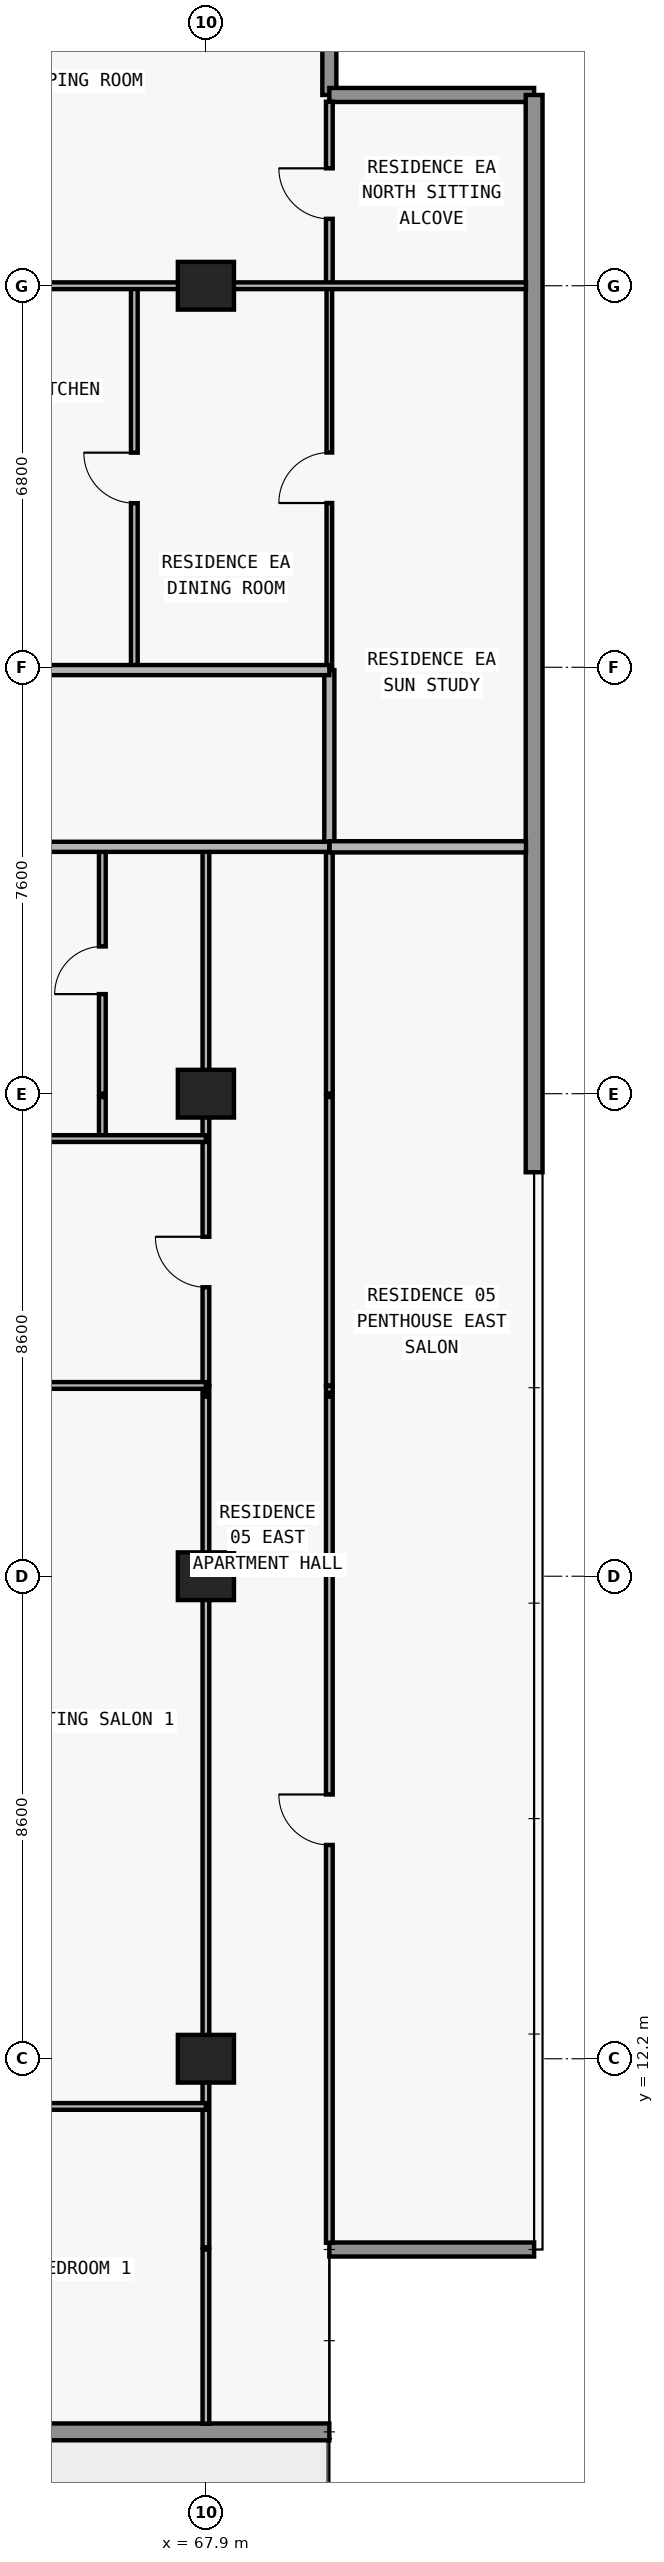
"""IFC4 building model, lengths in metres.
Left out: names, types, materials, properties, quantities, classifications, styles, units other than length and angle.
Written with IfcOpenShell. Run it as: python <this file> out.ifc"""

import sys

from ifc_helpers import new_model, si_unit, direction, frame, frame_2d, origin, origin_2d, place, context, subcontext, project, spatial, rectangle, extrude, element, fill, save


model = new_model("IFC4")
c1 = context("Model", 3, precision=1e-05, world=origin(), true_north=direction((0.0, 1.0)))
c2 = subcontext(c1, "Body", "Model", "MODEL_VIEW")
j1 = project(units=[si_unit("LENGTHUNIT", "METRE"), si_unit("PLANEANGLEUNIT", "RADIAN")], contexts=[c1])
p1 = place(None, origin())
s1 = spatial("IfcSite", under=j1, at=p1, CompositionType="ELEMENT")
p2 = place(p1, origin())
s2 = spatial("IfcBuilding", under=s1, at=p2, CompositionType="ELEMENT")
p3 = place(p2, frame((0.0, 0.0, 94.5)))
s3 = spatial("IfcBuildingStorey", under=s2, at=p3, CompositionType="ELEMENT", Elevation=94.5)
for number, where, z_axis, x_axis in (
    (1, (67.9, 12.2, 0.0), (0.0, 0.0, 1.0), (1.0, 0.0, 0.0)),
    (2, (67.9, 20.8, 0.0), (0.0, 0.0, 1.0), (1.0, 0.0, 0.0)),
    (3, (67.9, 29.4, 0.0), (0.0, 0.0, 1.0), (1.0, 0.0, 0.0)),
    (4, (67.9, 43.8, 0.0), (0.0, 0.0, 1.0), (1.0, 0.0, 0.0)),
):
    element("IfcColumn", number, at=place(p3, frame(where, z_axis=z_axis, x_axis=x_axis)), inside=s3, PredefinedType="COLUMN", context=c2, shape_type="SweptSolid", body=[
        extrude(rectangle(XDim=1.0, YDim=0.85, at=origin_2d()), origin(), (0.0, 0.0, 1.0), 3.0),
    ])
p4 = place(p3, frame((70.1, 5.55, 0.0), z_axis=(0.0, 0.0, 1.0), x_axis=(-1.0, 0.0, 0.0)))
e5 = element("IfcWall", 5, at=p4, inside=s3, PredefinedType="STANDARD", context=c2, shape_type="SweptSolid", body=[
    extrude(rectangle(XDim=62.4, YDim=0.3, at=frame_2d((31.2, 0.0))), origin(), (0.0, 0.0, 1.0), 3.0),
])
p5 = place(p4, frame((57.29, 0.0, 0.0)))
e6 = element("IfcOpeningElement", 6, at=p5, cuts=e5, PredefinedType="OPENING", context=c2, shape_type="SweptSolid", body=[
    extrude(rectangle(XDim=2.0, YDim=2.3, at=frame_2d((1.0, 1.15))), frame((0.0, 0.16, 0.0), z_axis=(0.0, -1.0, 0.0), x_axis=(1.0, 0.0, 0.0)), (0.0, 0.0, 1.0), 0.32),
])
p6 = place(p4, frame((52.61, 0.0, 0.65)))
e7 = element("IfcOpeningElement", 7, at=p6, cuts=e5, PredefinedType="OPENING", context=c2, shape_type="SweptSolid", body=[
    extrude(rectangle(XDim=2.6, YDim=1.85, at=frame_2d((1.3, 0.925))), frame((0.0, 0.16, 0.0), z_axis=(0.0, -1.0, 0.0), x_axis=(1.0, 0.0, 0.0)), (0.0, 0.0, 1.0), 0.32),
])
p7 = place(p4, frame((46.5, 0.0, 0.85)))
e8 = element("IfcOpeningElement", 8, at=p7, cuts=e5, PredefinedType="OPENING", context=c2, shape_type="SweptSolid", body=[
    extrude(rectangle(XDim=2.2, YDim=1.55, at=frame_2d((1.1, 0.775))), frame((0.0, 0.16, 0.0), z_axis=(0.0, -1.0, 0.0), x_axis=(1.0, 0.0, 0.0)), (0.0, 0.0, 1.0), 0.32),
])
p8 = place(p4, frame((40.09, 0.0, 0.0)))
e9 = element("IfcOpeningElement", 9, at=p8, cuts=e5, PredefinedType="OPENING", context=c2, shape_type="SweptSolid", body=[
    extrude(rectangle(XDim=2.0, YDim=2.3, at=frame_2d((1.0, 1.15))), frame((0.0, 0.16, 0.0), z_axis=(0.0, -1.0, 0.0), x_axis=(1.0, 0.0, 0.0)), (0.0, 0.0, 1.0), 0.32),
])
p9 = place(p4, frame((35.99, 0.0, 0.85)))
e10 = element("IfcOpeningElement", 10, at=p9, cuts=e5, PredefinedType="OPENING", context=c2, shape_type="SweptSolid", body=[
    extrude(rectangle(XDim=1.8, YDim=1.55, at=frame_2d((0.9, 0.775))), frame((0.0, 0.16, 0.0), z_axis=(0.0, -1.0, 0.0), x_axis=(1.0, 0.0, 0.0)), (0.0, 0.0, 1.0), 0.32),
])
p10 = place(p4, frame((28.314, 0.0, 0.85)))
e11 = element("IfcOpeningElement", 11, at=p10, cuts=e5, PredefinedType="OPENING", context=c2, shape_type="SweptSolid", body=[
    extrude(rectangle(XDim=2.2, YDim=1.55, at=frame_2d((1.1, 0.775))), frame((0.0, 0.16, 0.0), z_axis=(0.0, -1.0, 0.0), x_axis=(1.0, 0.0, 0.0)), (0.0, 0.0, 1.0), 0.32),
])
p11 = place(p4, frame((24.09, 0.0, 0.0)))
e12 = element("IfcOpeningElement", 12, at=p11, cuts=e5, PredefinedType="OPENING", context=c2, shape_type="SweptSolid", body=[
    extrude(rectangle(XDim=2.0, YDim=2.3, at=frame_2d((1.0, 1.15))), frame((0.0, 0.16, 0.0), z_axis=(0.0, -1.0, 0.0), x_axis=(1.0, 0.0, 0.0)), (0.0, 0.0, 1.0), 0.32),
])
p12 = place(p4, frame((19.99, 0.0, 0.85)))
e13 = element("IfcOpeningElement", 13, at=p12, cuts=e5, PredefinedType="OPENING", context=c2, shape_type="SweptSolid", body=[
    extrude(rectangle(XDim=1.8, YDim=1.55, at=frame_2d((0.9, 0.775))), frame((0.0, 0.16, 0.0), z_axis=(0.0, -1.0, 0.0), x_axis=(1.0, 0.0, 0.0)), (0.0, 0.0, 1.0), 0.32),
])
p13 = place(p4, frame((16.09, 0.0, 0.0)))
e14 = element("IfcOpeningElement", 14, at=p13, cuts=e5, PredefinedType="OPENING", context=c2, shape_type="SweptSolid", body=[
    extrude(rectangle(XDim=2.0, YDim=2.3, at=frame_2d((1.0, 1.15))), frame((0.0, 0.16, 0.0), z_axis=(0.0, -1.0, 0.0), x_axis=(1.0, 0.0, 0.0)), (0.0, 0.0, 1.0), 0.32),
])
p14 = place(p4, frame((11.41, 0.0, 0.65)))
e15 = element("IfcOpeningElement", 15, at=p14, cuts=e5, PredefinedType="OPENING", context=c2, shape_type="SweptSolid", body=[
    extrude(rectangle(XDim=2.6, YDim=1.85, at=frame_2d((1.3, 0.925))), frame((0.0, 0.16, 0.0), z_axis=(0.0, -1.0, 0.0), x_axis=(1.0, 0.0, 0.0)), (0.0, 0.0, 1.0), 0.32),
])
p15 = place(p4, frame((5.3, 0.0, 0.85)))
e16 = element("IfcOpeningElement", 16, at=p15, cuts=e5, PredefinedType="OPENING", context=c2, shape_type="SweptSolid", body=[
    extrude(rectangle(XDim=2.2, YDim=1.55, at=frame_2d((1.1, 0.775))), frame((0.0, 0.16, 0.0), z_axis=(0.0, -1.0, 0.0), x_axis=(1.0, 0.0, 0.0)), (0.0, 0.0, 1.0), 0.32),
])
p16 = place(p3, frame((70.1, 8.8, 0.0), z_axis=(0.0, 0.0, 1.0), x_axis=(1.0, 0.0, 0.0)))
e17 = element("IfcWall", 17, at=p16, inside=s3, PredefinedType="ELEMENTEDWALL", context=c2, shape_type="SweptSolid", body=[
    extrude(rectangle(XDim=3.65, YDim=0.25, at=frame_2d((1.825, 0.0))), origin(), (0.0, 0.0, 1.0), 3.0),
])
p17 = place(p3, frame((70.1, 50.45, 0.0), z_axis=(0.0, 0.0, 1.0), x_axis=(0.0, -1.0, 0.0)))
e18 = element("IfcWall", 18, at=p17, inside=s3, PredefinedType="ELEMENTEDWALL", context=c2, shape_type="SweptSolid", body=[
    extrude(rectangle(XDim=3.25, YDim=0.25, at=frame_2d((1.625, 0.0))), origin(), (0.0, 0.0, 1.0), 3.0),
])
p18 = place(p3, frame((70.1, 47.2, 0.0), z_axis=(0.0, 0.0, 1.0), x_axis=(1.0, 0.0, 0.0)))
e19 = element("IfcWall", 19, at=p18, inside=s3, PredefinedType="ELEMENTEDWALL", context=c2, shape_type="SweptSolid", body=[
    extrude(rectangle(XDim=3.65, YDim=0.25, at=frame_2d((1.825, 0.0))), origin(), (0.0, 0.0, 1.0), 3.0),
])
p19 = place(p3, frame((73.75, 47.2, 0.0), z_axis=(0.0, 0.0, 1.0), x_axis=(0.0, -1.0, 0.0)))
e20 = element("IfcWall", 20, at=p19, inside=s3, PredefinedType="STANDARD", context=c2, shape_type="SweptSolid", body=[
    extrude(rectangle(XDim=19.2, YDim=0.3, at=frame_2d((9.6, 0.0))), origin(), (0.0, 0.0, 1.0), 3.0),
])
p20 = place(p3, frame((66.054, 28.6, 0.0), z_axis=(0.0, 0.0, 1.0), x_axis=(0.0, 1.0, 0.0)))
e21 = element("IfcWall", 21, at=p20, inside=s3, PredefinedType="PARTITIONING", context=c2, shape_type="SweptSolid", body=[
    extrude(rectangle(XDim=0.74, YDim=0.12, at=frame_2d((0.37, 0.0))), origin(), (0.0, 0.0, 1.0), 2.629),
])
p21 = place(p3, frame((66.054, 29.4, 0.0), z_axis=(0.0, 0.0, 1.0), x_axis=(0.0, 1.0, 0.0)))
e22 = element("IfcWall", 22, at=p21, inside=s3, PredefinedType="PARTITIONING", context=c2, shape_type="SweptSolid", body=[
    extrude(rectangle(XDim=4.4, YDim=0.12, at=frame_2d((2.2, 0.0))), origin(), (0.0, 0.0, 1.0), 2.629),
])
p22 = place(p21, frame((1.775, 0.0, 0.0)))
e23 = element("IfcOpeningElement", 23, at=p22, cuts=e22, PredefinedType="OPENING", context=c2, shape_type="SweptSolid", body=[
    extrude(rectangle(XDim=0.85, YDim=2.1, at=frame_2d((0.425, 1.05))), frame((0.0, 0.07, 0.0), z_axis=(0.0, -1.0, 0.0), x_axis=(1.0, 0.0, 0.0)), (0.0, 0.0, 1.0), 0.14),
])
p23 = place(p3, frame((66.624, 36.95, 0.0), z_axis=(0.0, 0.0, 1.0), x_axis=(0.0, 1.0, 0.0)))
e24 = element("IfcWall", 24, at=p23, inside=s3, PredefinedType="PARTITIONING", context=c2, shape_type="SweptSolid", body=[
    extrude(rectangle(XDim=6.85, YDim=0.12, at=frame_2d((3.425, 0.0))), origin(), (0.0, 0.0, 1.0), 3.0),
])
p24 = place(p23, frame((2.975, 0.0, 0.0)))
e25 = element("IfcOpeningElement", 25, at=p24, cuts=e24, PredefinedType="OPENING", context=c2, shape_type="SweptSolid", body=[
    extrude(rectangle(XDim=0.9, YDim=2.15, at=frame_2d((0.45, 1.075))), frame((0.0, 0.07, 0.0), z_axis=(0.0, -1.0, 0.0), x_axis=(1.0, 0.0, 0.0)), (0.0, 0.0, 1.0), 0.14),
])
p25 = place(p3, frame((67.9, 5.695, 0.0), z_axis=(0.0, 0.0, 1.0), x_axis=(0.0, 1.0, 0.0)))
e26 = element("IfcWall", 26, at=p25, inside=s3, PredefinedType="PARTITIONING", context=c2, shape_type="SweptSolid", body=[
    extrude(rectangle(XDim=3.105, YDim=0.12, at=frame_2d((1.552, 0.0))), origin(), (0.0, 0.0, 1.0), 3.0),
])
p26 = place(p3, frame((67.9, 8.84, 0.0), z_axis=(0.0, 0.0, 1.0), x_axis=(0.0, 1.0, 0.0)))
e27 = element("IfcWall", 27, at=p26, inside=s3, PredefinedType="PARTITIONING", context=c2, shape_type="SweptSolid", body=[
    extrude(rectangle(XDim=15.16, YDim=0.12, at=frame_2d((7.58, 0.0))), origin(), (0.0, 0.0, 1.0), 2.124),
])
p27 = place(p3, frame((67.9, 24.07, 0.0), z_axis=(0.0, 0.0, 1.0), x_axis=(0.0, 1.0, 0.0)))
e28 = element("IfcWall", 28, at=p27, inside=s3, PredefinedType="PARTITIONING", context=c2, shape_type="SweptSolid", body=[
    extrude(rectangle(XDim=0.12, YDim=0.12, at=frame_2d((0.06, 0.0))), origin(), (0.0, 0.0, 1.0), 2.124),
])
p28 = place(p3, frame((67.9, 24.2, 0.0), z_axis=(0.0, 0.0, 1.0), x_axis=(0.0, 1.0, 0.0)))
e29 = element("IfcWall", 29, at=p28, inside=s3, PredefinedType="PARTITIONING", context=c2, shape_type="SweptSolid", body=[
    extrude(rectangle(XDim=5.14, YDim=0.12, at=frame_2d((2.57, 0.0))), origin(), (0.0, 0.0, 1.0), 2.124),
])
p29 = place(p28, frame((1.75, 0.0, 0.0)))
e30 = element("IfcOpeningElement", 30, at=p29, cuts=e29, PredefinedType="OPENING", context=c2, shape_type="SweptSolid", body=[
    extrude(rectangle(XDim=0.9, YDim=2.074, at=frame_2d((0.45, 1.037))), frame((0.0, 0.07, 0.0), z_axis=(0.0, -1.0, 0.0), x_axis=(1.0, 0.0, 0.0)), (0.0, 0.0, 1.0), 0.14),
])
p30 = place(p3, frame((67.9, 29.4, 0.0), z_axis=(0.0, 0.0, 1.0), x_axis=(0.0, 1.0, 0.0)))
e31 = element("IfcWall", 31, at=p30, inside=s3, PredefinedType="PARTITIONING", context=c2, shape_type="SweptSolid", body=[
    extrude(rectangle(XDim=4.4, YDim=0.12, at=frame_2d((2.2, 0.0))), origin(), (0.0, 0.0, 1.0), 2.124),
])
p31 = place(p3, frame((70.1, 8.92, 0.0), z_axis=(0.0, 0.0, 1.0), x_axis=(0.0, 1.0, 0.0)))
e32 = element("IfcWall", 32, at=p31, inside=s3, PredefinedType="PARTITIONING", context=c2, shape_type="SweptSolid", body=[
    extrude(rectangle(XDim=15.08, YDim=0.12, at=frame_2d((7.54, 0.0))), origin(), (0.0, 0.0, 1.0), 3.0),
])
p32 = place(p31, frame((7.09, 0.0, 0.0)))
e33 = element("IfcOpeningElement", 33, at=p32, cuts=e32, PredefinedType="OPENING", context=c2, shape_type="SweptSolid", body=[
    extrude(rectangle(XDim=0.9, YDim=2.15, at=frame_2d((0.45, 1.075))), frame((0.0, 0.07, 0.0), z_axis=(0.0, -1.0, 0.0), x_axis=(1.0, 0.0, 0.0)), (0.0, 0.0, 1.0), 0.14),
])
p33 = place(p3, frame((70.1, 24.07, 0.0), z_axis=(0.0, 0.0, 1.0), x_axis=(0.0, 1.0, 0.0)))
e34 = element("IfcWall", 34, at=p33, inside=s3, PredefinedType="PARTITIONING", context=c2, shape_type="SweptSolid", body=[
    extrude(rectangle(XDim=0.12, YDim=0.12, at=frame_2d((0.06, 0.0))), origin(), (0.0, 0.0, 1.0), 3.0),
])
p34 = place(p3, frame((70.1, 24.2, 0.0), z_axis=(0.0, 0.0, 1.0), x_axis=(0.0, 1.0, 0.0)))
e35 = element("IfcWall", 35, at=p34, inside=s3, PredefinedType="PARTITIONING", context=c2, shape_type="SweptSolid", body=[
    extrude(rectangle(XDim=5.14, YDim=0.12, at=frame_2d((2.57, 0.0))), origin(), (0.0, 0.0, 1.0), 3.0),
])
p35 = place(p3, frame((70.1, 29.4, 0.0), z_axis=(0.0, 0.0, 1.0), x_axis=(0.0, 1.0, 0.0)))
e36 = element("IfcWall", 36, at=p35, inside=s3, PredefinedType="PARTITIONING", context=c2, shape_type="SweptSolid", body=[
    extrude(rectangle(XDim=4.4, YDim=0.12, at=frame_2d((2.2, 0.0))), origin(), (0.0, 0.0, 1.0), 3.0),
])
p36 = place(p3, frame((70.1, 33.805, 0.0), z_axis=(0.0, 0.0, 1.0), x_axis=(0.0, 1.0, 0.0)))
e37 = element("IfcWall", 37, at=p36, inside=s3, PredefinedType="PARTITIONING", context=c2, shape_type="SweptSolid", body=[
    extrude(rectangle(XDim=3.145, YDim=0.18, at=frame_2d((1.573, 0.0))), origin(), (0.0, 0.0, 1.0), 3.0),
])
p37 = place(p3, frame((70.1, 36.955, 0.0), z_axis=(0.0, 0.0, 1.0), x_axis=(0.0, 1.0, 0.0)))
e38 = element("IfcWall", 38, at=p37, inside=s3, PredefinedType="MOVABLE", context=c2, shape_type="SweptSolid", body=[
    extrude(rectangle(XDim=6.845, YDim=0.1, at=frame_2d((3.422, 0.0))), origin(), (0.0, 0.0, 1.0), 3.0),
])
p38 = place(p37, frame((2.972, 0.0, 0.0)))
e39 = element("IfcOpeningElement", 39, at=p38, cuts=e38, PredefinedType="OPENING", context=c2, shape_type="SweptSolid", body=[
    extrude(rectangle(XDim=0.9, YDim=2.15, at=frame_2d((0.45, 1.075))), frame((0.0, 0.06, 0.0), z_axis=(0.0, -1.0, 0.0), x_axis=(1.0, 0.0, 0.0)), (0.0, 0.0, 1.0), 0.12),
])
p39 = place(p3, frame((70.1, 43.805, 0.0), z_axis=(0.0, 0.0, 1.0), x_axis=(0.0, 1.0, 0.0)))
e40 = element("IfcWall", 40, at=p39, inside=s3, PredefinedType="PARTITIONING", context=c2, shape_type="SweptSolid", body=[
    extrude(rectangle(XDim=3.275, YDim=0.12, at=frame_2d((1.638, 0.0))), origin(), (0.0, 0.0, 1.0), 3.0),
])
p40 = place(p39, frame((1.188, 0.0, 0.0)))
e41 = element("IfcOpeningElement", 41, at=p40, cuts=e40, PredefinedType="OPENING", context=c2, shape_type="SweptSolid", body=[
    extrude(rectangle(XDim=0.9, YDim=2.15, at=frame_2d((0.45, 1.075))), frame((0.0, 0.07, 0.0), z_axis=(0.0, -1.0, 0.0), x_axis=(1.0, 0.0, 0.0)), (0.0, 0.0, 1.0), 0.14),
])
p41 = place(p3, frame((59.55, 11.35, 0.0), z_axis=(0.0, 0.0, 1.0), x_axis=(1.0, 0.0, 0.0)))
e42 = element("IfcWall", 42, at=p41, inside=s3, PredefinedType="PARTITIONING", context=c2, shape_type="SweptSolid", body=[
    extrude(rectangle(XDim=8.35, YDim=0.12, at=frame_2d((4.175, 0.0))), origin(), (0.0, 0.0, 1.0), 3.0),
])
p42 = place(p41, frame((3.725, 0.0, 0.0)))
e43 = element("IfcOpeningElement", 43, at=p42, cuts=e42, PredefinedType="OPENING", context=c2, shape_type="SweptSolid", body=[
    extrude(rectangle(XDim=0.9, YDim=2.15, at=frame_2d((0.45, 1.075))), frame((0.0, 0.07, 0.0), z_axis=(0.0, -1.0, 0.0), x_axis=(1.0, 0.0, 0.0)), (0.0, 0.0, 1.0), 0.14),
])
p43 = place(p3, frame((59.55, 24.2, 0.0), z_axis=(0.0, 0.0, 1.0), x_axis=(1.0, 0.0, 0.0)))
e44 = element("IfcWall", 44, at=p43, inside=s3, PredefinedType="PARTITIONING", context=c2, shape_type="SweptSolid", body=[
    extrude(rectangle(XDim=8.35, YDim=0.12, at=frame_2d((4.175, 0.0))), origin(), (0.0, 0.0, 1.0), 3.0),
])
p44 = place(p43, frame((3.725, 0.0, 0.0)))
e45 = element("IfcOpeningElement", 45, at=p44, cuts=e44, PredefinedType="OPENING", context=c2, shape_type="SweptSolid", body=[
    extrude(rectangle(XDim=0.9, YDim=2.15, at=frame_2d((0.45, 1.075))), frame((0.0, 0.07, 0.0), z_axis=(0.0, -1.0, 0.0), x_axis=(1.0, 0.0, 0.0)), (0.0, 0.0, 1.0), 0.14),
])
p45 = place(p3, frame((59.55, 28.6, 0.0), z_axis=(0.0, 0.0, 1.0), x_axis=(1.0, 0.0, 0.0)))
e46 = element("IfcWall", 46, at=p45, inside=s3, PredefinedType="PARTITIONING", context=c2, shape_type="SweptSolid", body=[
    extrude(rectangle(XDim=8.35, YDim=0.12, at=frame_2d((4.175, 0.0))), origin(), (0.0, 0.0, 1.0), 3.0),
])
p46 = place(p45, frame((2.802, 0.0, 0.0)))
e47 = element("IfcOpeningElement", 47, at=p46, cuts=e46, PredefinedType="OPENING", context=c2, shape_type="SweptSolid", body=[
    extrude(rectangle(XDim=0.9, YDim=2.15, at=frame_2d((0.45, 1.075))), frame((0.0, 0.07, 0.0), z_axis=(0.0, -1.0, 0.0), x_axis=(1.0, 0.0, 0.0)), (0.0, 0.0, 1.0), 0.14),
])
p47 = place(p3, frame((59.55, 33.8, 0.0), z_axis=(0.0, 0.0, 1.0), x_axis=(1.0, 0.0, 0.0)))
e48 = element("IfcWall", 48, at=p47, inside=s3, PredefinedType="PARTITIONING", context=c2, shape_type="SweptSolid", body=[
    extrude(rectangle(XDim=10.55, YDim=0.18, at=frame_2d((5.275, 0.0))), origin(), (0.0, 0.0, 1.0), 3.0),
])
p48 = place(p3, frame((70.105, 33.8, 0.0), z_axis=(0.0, 0.0, 1.0), x_axis=(1.0, 0.0, 0.0)))
e49 = element("IfcWall", 49, at=p48, inside=s3, PredefinedType="PARTITIONING", context=c2, shape_type="SweptSolid", body=[
    extrude(rectangle(XDim=3.5, YDim=0.2, at=frame_2d((1.75, 0.0))), origin(), (0.0, 0.0, 1.0), 3.0),
])
p49 = place(p3, frame((59.955, 36.95, 0.0), z_axis=(0.0, 0.0, 1.0), x_axis=(1.0, 0.0, 0.0)))
e50 = element("IfcWall", 50, at=p49, inside=s3, PredefinedType="PARTITIONING", context=c2, shape_type="SweptSolid", body=[
    extrude(rectangle(XDim=10.145, YDim=0.18, at=frame_2d((5.073, 0.0))), origin(), (0.0, 0.0, 1.0), 3.0),
])
p50 = place(p49, frame((3.957, 0.0, 0.0)))
e51 = element("IfcOpeningElement", 51, at=p50, cuts=e50, PredefinedType="OPENING", context=c2, shape_type="SweptSolid", body=[
    extrude(rectangle(XDim=1.0, YDim=2.2, at=frame_2d((0.5, 1.1))), frame((0.0, 0.1, 0.0), z_axis=(0.0, -1.0, 0.0), x_axis=(1.0, 0.0, 0.0)), (0.0, 0.0, 1.0), 0.2),
])
p51 = place(p3, frame((59.945, 43.8, 0.0), z_axis=(0.0, 0.0, 1.0), x_axis=(1.0, 0.0, 0.0)))
e52 = element("IfcWall", 52, at=p51, inside=s3, PredefinedType="PARTITIONING", context=c2, shape_type="SweptSolid", body=[
    extrude(rectangle(XDim=13.66, YDim=0.12, at=frame_2d((6.83, 0.0))), origin(), (0.0, 0.0, 1.0), 2.289),
])
p52 = place(p51, frame((4.017, 0.0, 0.0)))
e53 = element("IfcOpeningElement", 53, at=p52, cuts=e52, PredefinedType="OPENING", context=c2, shape_type="SweptSolid", body=[
    extrude(rectangle(XDim=0.9, YDim=2.15, at=frame_2d((0.45, 1.075))), frame((0.0, 0.07, 0.0), z_axis=(0.0, -1.0, 0.0), x_axis=(1.0, 0.0, 0.0)), (0.0, 0.0, 1.0), 0.14),
])
p53 = place(p51, frame((0.702, 0.0, 0.0)))
e54 = element("IfcOpeningElement", 54, at=p53, cuts=e52, PredefinedType="OPENING", context=c2, shape_type="SweptSolid", body=[
    extrude(rectangle(XDim=0.85, YDim=2.1, at=frame_2d((0.425, 1.05))), frame((0.0, 0.07, 0.0), z_axis=(0.0, -1.0, 0.0), x_axis=(1.0, 0.0, 0.0)), (0.0, 0.0, 1.0), 0.14),
])
p54 = place(p22, origin())
e55 = element("IfcDoor", 55, at=p54, inside=s3, OperationType="SINGLE_SWING_LEFT", PredefinedType="DOOR", context=c2, shape_type="SweptSolid", body=[
    extrude(rectangle(XDim=0.85, YDim=2.1, at=frame_2d((0.425, 1.05))), frame((0.0, 0.025, 0.0), z_axis=(0.0, -1.0, 0.0), x_axis=(1.0, 0.0, 0.0)), (0.0, 0.0, 1.0), 0.05),
])
fill(e23, e55)
p55 = place(p29, origin())
e56 = element("IfcDoor", 56, at=p55, inside=s3, OperationType="SINGLE_SWING_RIGHT", PredefinedType="DOOR", context=c2, shape_type="SweptSolid", body=[
    extrude(rectangle(XDim=0.9, YDim=2.074, at=frame_2d((0.45, 1.037))), frame((0.0, 0.025, 0.0), z_axis=(0.0, -1.0, 0.0), x_axis=(1.0, 0.0, 0.0)), (0.0, 0.0, 1.0), 0.05),
])
fill(e30, e56)
p56 = place(p32, origin())
e57 = element("IfcDoor", 57, at=p56, inside=s3, OperationType="SINGLE_SWING_RIGHT", PredefinedType="DOOR", context=c2, shape_type="SweptSolid", body=[
    extrude(rectangle(XDim=0.9, YDim=2.15, at=frame_2d((0.45, 1.075))), frame((0.0, 0.025, 0.0), z_axis=(0.0, -1.0, 0.0), x_axis=(1.0, 0.0, 0.0)), (0.0, 0.0, 1.0), 0.05),
])
fill(e33, e57)
p57 = place(p24, origin())
e58 = element("IfcDoor", 58, at=p57, inside=s3, OperationType="SINGLE_SWING_RIGHT", PredefinedType="DOOR", context=c2, shape_type="SweptSolid", body=[
    extrude(rectangle(XDim=0.9, YDim=2.15, at=frame_2d((0.45, 1.075))), frame((0.0, 0.025, 0.0), z_axis=(0.0, -1.0, 0.0), x_axis=(1.0, 0.0, 0.0)), (0.0, 0.0, 1.0), 0.05),
])
fill(e25, e58)
p58 = place(p38, origin())
e59 = element("IfcDoor", 59, at=p58, inside=s3, OperationType="SINGLE_SWING_LEFT", PredefinedType="DOOR", context=c2, shape_type="SweptSolid", body=[
    extrude(rectangle(XDim=0.9, YDim=2.15, at=frame_2d((0.45, 1.075))), frame((0.0, 0.025, 0.0), z_axis=(0.0, -1.0, 0.0), x_axis=(1.0, 0.0, 0.0)), (0.0, 0.0, 1.0), 0.05),
])
fill(e39, e59)
p59 = place(p40, origin())
e60 = element("IfcDoor", 60, at=p59, inside=s3, OperationType="SINGLE_SWING_RIGHT", PredefinedType="DOOR", context=c2, shape_type="SweptSolid", body=[
    extrude(rectangle(XDim=0.9, YDim=2.15, at=frame_2d((0.45, 1.075))), frame((0.0, 0.025, 0.0), z_axis=(0.0, -1.0, 0.0), x_axis=(1.0, 0.0, 0.0)), (0.0, 0.0, 1.0), 0.05),
])
fill(e41, e60)
save(model, sys.argv[1])
